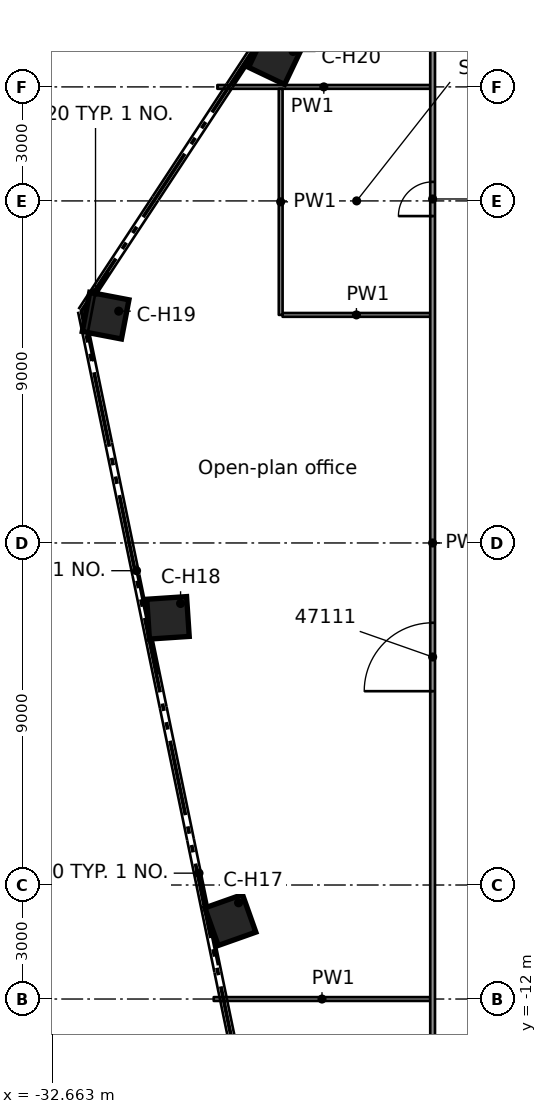
"""IFC4 building model, lengths in metres.
Left out: names, types, materials, properties, quantities, classifications, styles, units other than length and angle.
Written with IfcOpenShell. Run it as: python <this file> out.ifc"""

import sys

from ifc_helpers import new_model, si_unit, direction, frame, frame_2d, origin, origin_2d, place, context, subcontext, project, spatial, rectangle, extrude, element, fill, save


model = new_model("IFC4")
c1 = context("Model", 3, precision=1e-05, world=origin(), true_north=direction((0.0, 1.0)))
c2 = subcontext(c1, "Body", "Model", "MODEL_VIEW")
j1 = project(units=[si_unit("LENGTHUNIT", "METRE"), si_unit("PLANEANGLEUNIT", "RADIAN")], contexts=[c1])
p1 = place(None, origin())
s1 = spatial("IfcSite", under=j1, at=p1, CompositionType="ELEMENT")
p2 = place(p1, origin())
s2 = spatial("IfcBuilding", under=s1, at=p2, CompositionType="ELEMENT")
p3 = place(p2, frame((0.0, 0.0, 232.0)))
s3 = spatial("IfcBuildingStorey", under=s2, at=p3, CompositionType="ELEMENT", Elevation=232.0)
for number, where, z_axis, x_axis in (
    (1, (-27.972, -9.921, 0.0), (0.0, 0.0, 1.0), (-0.942, -0.334, 0.0)),
    (2, (-29.613, -1.97, 0.0), (0.0, 0.0, 1.0), (-0.998, -0.066, 0.0)),
    (3, (-31.255, 5.981, 0.0), (0.0, 0.0, 1.0), (-0.982, 0.188, 0.0)),
    (4, (-26.794, 12.764, 0.0), (0.0, 0.0, 1.0), (-0.903, 0.43, 0.0)),
):
    element("IfcColumn", number, at=place(p3, frame(where, z_axis=z_axis, x_axis=x_axis)), inside=s3, PredefinedType="COLUMN", context=c2, shape_type="SweptSolid", body=[
        extrude(rectangle(XDim=1.05, YDim=1.05, at=origin_2d()), origin(), (0.0, 0.0, 1.0), 3.5),
    ])
p4 = place(p3, frame((-28.41, -12.0, 0.0), z_axis=(0.0, 0.0, 1.0), x_axis=(1.0, 0.0, 0.0)))
e5 = element("IfcWall", 5, at=p4, inside=s3, PredefinedType="PARTITIONING", context=c2, shape_type="SweptSolid", body=[
    extrude(rectangle(XDim=5.698, YDim=0.1, at=frame_2d((2.849, 0.0))), origin(), (0.0, 0.0, 1.0), 3.08),
])
p5 = place(p3, frame((-26.598, 6.001, 0.0), z_axis=(0.0, 0.0, 1.0), x_axis=(1.0, 0.0, 0.0)))
e6 = element("IfcWall", 6, at=p5, inside=s3, PredefinedType="PARTITIONING", context=c2, shape_type="SweptSolid", body=[
    extrude(rectangle(XDim=3.886, YDim=0.1, at=frame_2d((1.943, 0.0))), origin(), (0.0, 0.0, 1.0), 3.08),
])
p6 = place(p3, frame((-28.314, 12.0, 0.0), z_axis=(0.0, 0.0, 1.0), x_axis=(1.0, 0.0, 0.0)))
e7 = element("IfcWall", 7, at=p6, inside=s3, PredefinedType="PARTITIONING", context=c2, shape_type="SweptSolid", body=[
    extrude(rectangle(XDim=5.602, YDim=0.1, at=frame_2d((2.801, 0.0))), origin(), (0.0, 0.0, 1.0), 3.08),
])
p7 = place(p3, frame((-22.65, -15.651, 0.0), z_axis=(0.0, 0.0, 1.0), x_axis=(0.0, 1.0, 0.0)))
e8 = element("IfcWall", 8, at=p7, inside=s3, PredefinedType="PARTITIONING", context=c2, shape_type="SweptSolid", body=[
    extrude(rectangle(XDim=31.302, YDim=0.125, at=frame_2d((15.651, 0.0))), origin(), (0.0, 0.0, 1.0), 3.08),
])
p8 = place(p7, frame((11.751, 0.0, 0.0)))
e9 = element("IfcOpeningElement", 9, at=p8, cuts=e8, PredefinedType="OPENING", context=c2, shape_type="SweptSolid", body=[
    extrude(rectangle(XDim=1.8, YDim=2.1, at=frame_2d((0.9, 1.05))), frame((0.0, 0.073, 0.0), z_axis=(0.0, -1.0, 0.0), x_axis=(1.0, 0.0, 0.0)), (0.0, 0.0, 1.0), 0.145),
])
p9 = place(p7, frame((24.252, 0.0, 0.0)))
e10 = element("IfcOpeningElement", 10, at=p9, cuts=e8, PredefinedType="OPENING", context=c2, shape_type="SweptSolid", body=[
    extrude(rectangle(XDim=0.9, YDim=2.1, at=frame_2d((0.45, 1.05))), frame((0.0, 0.073, 0.0), z_axis=(0.0, -1.0, 0.0), x_axis=(1.0, 0.0, 0.0)), (0.0, 0.0, 1.0), 0.145),
])
p10 = place(p3, frame((-26.648, 6.001, 0.0), z_axis=(0.0, 0.0, 1.0), x_axis=(0.0, 1.0, 0.0)))
e11 = element("IfcWall", 11, at=p10, inside=s3, PredefinedType="PARTITIONING", context=c2, shape_type="SweptSolid", body=[
    extrude(rectangle(XDim=5.949, YDim=0.1, at=frame_2d((2.975, 0.0))), origin(), (0.0, 0.0, 1.0), 3.08),
])
p11 = place(p8, origin())
e12 = element("IfcDoor", 12, at=p11, inside=s3, OperationType="DOUBLE_DOOR_SINGLE_SWING", PredefinedType="DOOR", context=c2, shape_type="SweptSolid", body=[
    extrude(rectangle(XDim=1.8, YDim=2.1, at=frame_2d((0.9, 1.05))), frame((0.0, 0.025, 0.0), z_axis=(0.0, -1.0, 0.0), x_axis=(1.0, 0.0, 0.0)), (0.0, 0.0, 1.0), 0.05),
])
fill(e9, e12)
p12 = place(p9, origin())
e13 = element("IfcDoor", 13, at=p12, inside=s3, OperationType="SINGLE_SWING_RIGHT", PredefinedType="DOOR", context=c2, shape_type="SweptSolid", body=[
    extrude(rectangle(XDim=0.9, YDim=2.1, at=frame_2d((0.45, 1.05))), frame((0.0, 0.025, 0.0), z_axis=(0.0, -1.0, 0.0), x_axis=(1.0, 0.0, 0.0)), (0.0, 0.0, 1.0), 0.05),
])
fill(e10, e13)
save(model, sys.argv[1])
